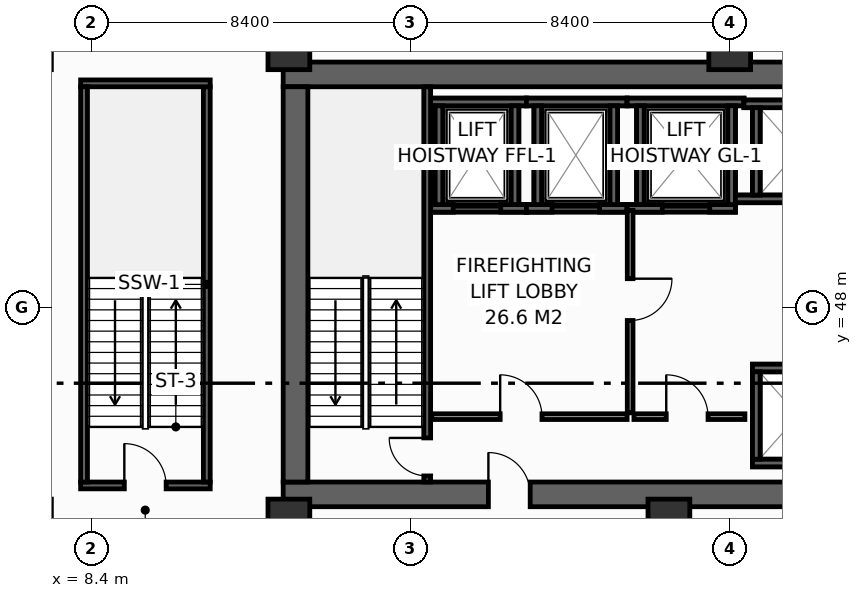
"""IFC4 building model, lengths in metres.
Left out: names, types, materials, properties, quantities, classifications, styles, units other than length and angle.
Written with IfcOpenShell. Run it as: python <this file> out.ifc"""

import sys

from ifc_helpers import new_model, si_unit, direction, frame, frame_2d, origin, origin_2d, place, context, subcontext, project, spatial, rectangle, extrude, element, fill, save


model = new_model("IFC4")
c1 = context("Model", 3, precision=1e-05, world=origin(), true_north=direction((0.0, 1.0)))
c2 = subcontext(c1, "Body", "Model", "MODEL_VIEW")
j1 = project(units=[si_unit("LENGTHUNIT", "METRE"), si_unit("PLANEANGLEUNIT", "RADIAN")], contexts=[c1])
p1 = place(None, origin())
s1 = spatial("IfcSite", under=j1, at=p1, CompositionType="ELEMENT")
p2 = place(p1, origin())
s2 = spatial("IfcBuilding", under=s1, at=p2, CompositionType="ELEMENT")
p3 = place(p2, frame((0.0, 0.0, -10.8)))
s3 = spatial("IfcBuildingStorey", under=s2, at=p3, CompositionType="ELEMENT", Elevation=-10.8)
p4 = place(p3, frame((13.45, 43.075, 0.0), z_axis=(0.0, 0.0, 1.0), x_axis=(1.0, 0.0, 0.0)))
e1 = element("IfcWall", 1, at=p4, inside=s3, PredefinedType="SHEAR", context=c2, shape_type="SweptSolid", body=[
    extrude(rectangle(XDim=33.0, YDim=0.65, at=frame_2d((16.5, 0.0))), origin(), (0.0, 0.0, 1.0), 5.05),
])
p5 = place(p4, frame((5.4, 0.0, 0.0)))
e2 = element("IfcOpeningElement", 2, at=p5, cuts=e1, PredefinedType="OPENING", context=c2, shape_type="SweptSolid", body=[
    extrude(rectangle(XDim=1.1, YDim=2.15, at=frame_2d((0.55, 1.075))), frame((0.0, 0.335, 0.0), z_axis=(0.0, -1.0, 0.0), x_axis=(1.0, 0.0, 0.0)), (0.0, 0.0, 1.0), 0.67),
])
p6 = place(p4, frame((25.6, 0.0, 0.0)))
e3 = element("IfcOpeningElement", 3, at=p6, cuts=e1, PredefinedType="OPENING", context=c2, shape_type="SweptSolid", body=[
    extrude(rectangle(XDim=1.1, YDim=2.15, at=frame_2d((0.55, 1.075))), frame((0.0, 0.335, 0.0), z_axis=(0.0, -1.0, 0.0), x_axis=(1.0, 0.0, 0.0)), (0.0, 0.0, 1.0), 0.67),
])
p7 = place(p3, frame((13.45, 54.125, 0.0), z_axis=(0.0, 0.0, 1.0), x_axis=(1.0, 0.0, 0.0)))
e4 = element("IfcWall", 4, at=p7, inside=s3, PredefinedType="SHEAR", context=c2, shape_type="SweptSolid", body=[
    extrude(rectangle(XDim=33.0, YDim=0.65, at=frame_2d((16.5, 0.0))), origin(), (0.0, 0.0, 1.0), 5.05),
])
p8 = place(p3, frame((13.775, 43.4, 0.0), z_axis=(0.0, 0.0, 1.0), x_axis=(0.0, 1.0, 0.0)))
e5 = element("IfcWall", 5, at=p8, inside=s3, PredefinedType="SHEAR", context=c2, shape_type="SweptSolid", body=[
    extrude(rectangle(XDim=10.4, YDim=0.65, at=frame_2d((5.2, 0.0))), origin(), (0.0, 0.0, 1.0), 5.05),
])
for number, where, z_axis, x_axis in (
    (6, (13.6, 54.8, 0.0), (0.0, 0.0, 1.0), (1.0, 0.0, 0.0)),
    (7, (25.2, 54.8, 0.0), (0.0, 0.0, 1.0), (1.0, 0.0, 0.0)),
    (8, (13.6, 42.4, 0.0), (0.0, 0.0, 1.0), (1.0, 0.0, 0.0)),
    (9, (23.6, 42.4, 0.0), (0.0, 0.0, 1.0), (1.0, 0.0, 0.0)),
):
    element("IfcColumn", number, at=place(p3, frame(where, z_axis=z_axis, x_axis=x_axis)), inside=s3, PredefinedType="COLUMN", context=c2, shape_type="SweptSolid", body=[
        extrude(rectangle(XDim=1.1, YDim=1.1, at=origin_2d()), origin(), (0.0, 0.0, 1.0), 5.4),
    ])
for number, where, z_axis, x_axis in (
    (10, (17.45, 50.6, -1.48), (0.0, 0.0, 1.0), (1.0, 0.0, 0.0)),
    (11, (17.45, 53.4, -1.48), (0.0, 0.0, 1.0), (1.0, 0.0, 0.0)),
):
    element("IfcWall", number, at=place(p3, frame(where, z_axis=z_axis, x_axis=x_axis)), inside=s3, PredefinedType="SHEAR", context=c2, shape_type="SweptSolid", body=[
        extrude(rectangle(XDim=2.4, YDim=0.2, at=frame_2d((1.2, 0.0))), origin(), (0.0, 0.0, 1.0), 1.48),
    ])
for number, where, z_axis, x_axis in (
    (12, (17.55, 50.7, -1.48), (0.0, 0.0, 1.0), (0.0, 1.0, 0.0)),
    (13, (19.55, 50.7, -1.48), (0.0, 0.0, 1.0), (0.0, 1.0, 0.0)),
):
    element("IfcWall", number, at=place(p3, frame(where, z_axis=z_axis, x_axis=x_axis)), inside=s3, PredefinedType="SHEAR", context=c2, shape_type="SweptSolid", body=[
        extrude(rectangle(XDim=2.6, YDim=0.2, at=frame_2d((1.3, 0.0))), origin(), (0.0, 0.0, 1.0), 1.48),
    ])
p9 = place(p3, frame((17.33, 50.6, 0.0), z_axis=(0.0, 0.0, 1.0), x_axis=(1.0, 0.0, 0.0)))
e14 = element("IfcWall", 14, at=p9, inside=s3, PredefinedType="SHEAR", context=c2, shape_type="SweptSolid", body=[
    extrude(rectangle(XDim=2.52, YDim=0.2, at=frame_2d((1.26, 0.0))), origin(), (0.0, 0.0, 1.0), 5.05),
])
p10 = place(p9, frame((0.595, 0.0, 0.0)))
e15 = element("IfcOpeningElement", 15, at=p10, cuts=e14, PredefinedType="OPENING", context=c2, shape_type="SweptSolid", body=[
    extrude(rectangle(XDim=1.25, YDim=2.3, at=frame_2d((0.625, 1.15))), frame((0.0, 0.11, 0.0), z_axis=(0.0, -1.0, 0.0), x_axis=(1.0, 0.0, 0.0)), (0.0, 0.0, 1.0), 0.22),
])
p11 = place(p3, frame((17.33, 53.4, 0.0), z_axis=(0.0, 0.0, 1.0), x_axis=(1.0, 0.0, 0.0)))
e16 = element("IfcWall", 16, at=p11, inside=s3, PredefinedType="SHEAR", context=c2, shape_type="SweptSolid", body=[
    extrude(rectangle(XDim=2.52, YDim=0.2, at=frame_2d((1.26, 0.0))), origin(), (0.0, 0.0, 1.0), 5.05),
])
for number, where, z_axis, x_axis in (
    (17, (17.55, 50.7, 0.0), (0.0, 0.0, 1.0), (0.0, 1.0, 0.0)),
    (18, (19.55, 50.7, 0.0), (0.0, 0.0, 1.0), (0.0, 1.0, 0.0)),
):
    element("IfcWall", number, at=place(p3, frame(where, z_axis=z_axis, x_axis=x_axis)), inside=s3, PredefinedType="SHEAR", context=c2, shape_type="SweptSolid", body=[
        extrude(rectangle(XDim=2.6, YDim=0.2, at=frame_2d((1.3, 0.0))), origin(), (0.0, 0.0, 1.0), 5.05),
    ])
for number, where, z_axis, x_axis in (
    (19, (19.85, 50.6, -1.48), (0.0, 0.0, 1.0), (1.0, 0.0, 0.0)),
    (20, (19.85, 53.4, -1.48), (0.0, 0.0, 1.0), (1.0, 0.0, 0.0)),
):
    element("IfcWall", number, at=place(p3, frame(where, z_axis=z_axis, x_axis=x_axis)), inside=s3, PredefinedType="SHEAR", context=c2, shape_type="SweptSolid", body=[
        extrude(rectangle(XDim=2.65, YDim=0.2, at=frame_2d((1.325, 0.0))), origin(), (0.0, 0.0, 1.0), 1.48),
    ])
for number, where, z_axis, x_axis in (
    (21, (20.15, 50.7, -1.48), (0.0, 0.0, 1.0), (0.0, 1.0, 0.0)),
    (22, (22.15, 50.7, -1.48), (0.0, 0.0, 1.0), (0.0, 1.0, 0.0)),
):
    element("IfcWall", number, at=place(p3, frame(where, z_axis=z_axis, x_axis=x_axis)), inside=s3, PredefinedType="SHEAR", context=c2, shape_type="SweptSolid", body=[
        extrude(rectangle(XDim=2.6, YDim=0.2, at=frame_2d((1.3, 0.0))), origin(), (0.0, 0.0, 1.0), 1.48),
    ])
p12 = place(p3, frame((19.85, 50.6, 0.0), z_axis=(0.0, 0.0, 1.0), x_axis=(1.0, 0.0, 0.0)))
e23 = element("IfcWall", 23, at=p12, inside=s3, PredefinedType="SHEAR", context=c2, shape_type="SweptSolid", body=[
    extrude(rectangle(XDim=2.65, YDim=0.2, at=frame_2d((1.325, 0.0))), origin(), (0.0, 0.0, 1.0), 5.05),
])
p13 = place(p12, frame((0.675, 0.0, 0.0)))
e24 = element("IfcOpeningElement", 24, at=p13, cuts=e23, PredefinedType="OPENING", context=c2, shape_type="SweptSolid", body=[
    extrude(rectangle(XDim=1.25, YDim=2.3, at=frame_2d((0.625, 1.15))), frame((0.0, 0.11, 0.0), z_axis=(0.0, -1.0, 0.0), x_axis=(1.0, 0.0, 0.0)), (0.0, 0.0, 1.0), 0.22),
])
p14 = place(p3, frame((19.85, 53.4, 0.0), z_axis=(0.0, 0.0, 1.0), x_axis=(1.0, 0.0, 0.0)))
e25 = element("IfcWall", 25, at=p14, inside=s3, PredefinedType="SHEAR", context=c2, shape_type="SweptSolid", body=[
    extrude(rectangle(XDim=2.65, YDim=0.2, at=frame_2d((1.325, 0.0))), origin(), (0.0, 0.0, 1.0), 5.05),
])
for number, where, z_axis, x_axis in (
    (26, (20.15, 50.7, 0.0), (0.0, 0.0, 1.0), (0.0, 1.0, 0.0)),
    (27, (22.15, 50.7, 0.0), (0.0, 0.0, 1.0), (0.0, 1.0, 0.0)),
):
    element("IfcWall", number, at=place(p3, frame(where, z_axis=z_axis, x_axis=x_axis)), inside=s3, PredefinedType="SHEAR", context=c2, shape_type="SweptSolid", body=[
        extrude(rectangle(XDim=2.6, YDim=0.2, at=frame_2d((1.3, 0.0))), origin(), (0.0, 0.0, 1.0), 5.05),
    ])
p15 = place(p3, frame((22.5, 50.6, -1.48), z_axis=(0.0, 0.0, 1.0), x_axis=(1.0, 0.0, 0.0)))
e28 = element("IfcWall", 28, at=p15, inside=s3, PredefinedType="SHEAR", context=c2, shape_type="SweptSolid", body=[
    extrude(rectangle(XDim=2.85, YDim=0.2, at=frame_2d((1.425, 0.0))), origin(), (0.0, 0.0, 1.0), 1.48),
])
p16 = place(p3, frame((22.5, 53.4, -1.48), z_axis=(0.0, 0.0, 1.0), x_axis=(1.0, 0.0, 0.0)))
e29 = element("IfcWall", 29, at=p16, inside=s3, PredefinedType="SHEAR", context=c2, shape_type="SweptSolid", body=[
    extrude(rectangle(XDim=3.075, YDim=0.2, at=frame_2d((1.538, 0.0))), origin(), (0.0, 0.0, 1.0), 1.48),
])
for number, where, z_axis, x_axis in (
    (30, (22.85, 50.7, -1.48), (0.0, 0.0, 1.0), (0.0, 1.0, 0.0)),
    (31, (25.25, 50.7, -1.48), (0.0, 0.0, 1.0), (0.0, 1.0, 0.0)),
):
    element("IfcWall", number, at=place(p3, frame(where, z_axis=z_axis, x_axis=x_axis)), inside=s3, PredefinedType="SHEAR", context=c2, shape_type="SweptSolid", body=[
        extrude(rectangle(XDim=2.6, YDim=0.2, at=frame_2d((1.3, 0.0))), origin(), (0.0, 0.0, 1.0), 1.48),
    ])
p17 = place(p3, frame((22.5, 50.6, 0.0), z_axis=(0.0, 0.0, 1.0), x_axis=(1.0, 0.0, 0.0)))
e32 = element("IfcWall", 32, at=p17, inside=s3, PredefinedType="SHEAR", context=c2, shape_type="SweptSolid", body=[
    extrude(rectangle(XDim=2.85, YDim=0.2, at=frame_2d((1.425, 0.0))), origin(), (0.0, 0.0, 1.0), 5.05),
])
p18 = place(p17, frame((0.925, 0.0, 0.0)))
e33 = element("IfcOpeningElement", 33, at=p18, cuts=e32, PredefinedType="OPENING", context=c2, shape_type="SweptSolid", body=[
    extrude(rectangle(XDim=1.25, YDim=2.3, at=frame_2d((0.625, 1.15))), frame((0.0, 0.11, 0.0), z_axis=(0.0, -1.0, 0.0), x_axis=(1.0, 0.0, 0.0)), (0.0, 0.0, 1.0), 0.22),
])
p19 = place(p3, frame((22.5, 53.4, 0.0), z_axis=(0.0, 0.0, 1.0), x_axis=(1.0, 0.0, 0.0)))
e34 = element("IfcWall", 34, at=p19, inside=s3, PredefinedType="SHEAR", context=c2, shape_type="SweptSolid", body=[
    extrude(rectangle(XDim=3.075, YDim=0.2, at=frame_2d((1.538, 0.0))), origin(), (0.0, 0.0, 1.0), 5.05),
])
for number, where, z_axis, x_axis in (
    (35, (22.85, 50.7, 0.0), (0.0, 0.0, 1.0), (0.0, 1.0, 0.0)),
    (36, (25.25, 50.7, 0.0), (0.0, 0.0, 1.0), (0.0, 1.0, 0.0)),
):
    element("IfcWall", number, at=place(p3, frame(where, z_axis=z_axis, x_axis=x_axis)), inside=s3, PredefinedType="SHEAR", context=c2, shape_type="SweptSolid", body=[
        extrude(rectangle(XDim=2.6, YDim=0.2, at=frame_2d((1.3, 0.0))), origin(), (0.0, 0.0, 1.0), 5.05),
    ])
p20 = place(p3, frame((25.35, 50.85, -1.48), z_axis=(0.0, 0.0, 1.0), x_axis=(1.0, 0.0, 0.0)))
e37 = element("IfcWall", 37, at=p20, inside=s3, PredefinedType="SHEAR", context=c2, shape_type="SweptSolid", body=[
    extrude(rectangle(XDim=3.025, YDim=0.2, at=frame_2d((1.512, 0.0))), origin(), (0.0, 0.0, 1.0), 1.48),
])
p21 = place(p3, frame((25.575, 53.35, -1.48), z_axis=(0.0, 0.0, 1.0), x_axis=(1.0, 0.0, 0.0)))
e38 = element("IfcWall", 38, at=p21, inside=s3, PredefinedType="SHEAR", context=c2, shape_type="SweptSolid", body=[
    extrude(rectangle(XDim=2.8, YDim=0.2, at=frame_2d((1.4, 0.0))), origin(), (0.0, 0.0, 1.0), 1.48),
])
p22 = place(p3, frame((25.9, 50.95, -1.48), z_axis=(0.0, 0.0, 1.0), x_axis=(0.0, 1.0, 0.0)))
e39 = element("IfcWall", 39, at=p22, inside=s3, PredefinedType="SHEAR", context=c2, shape_type="SweptSolid", body=[
    extrude(rectangle(XDim=2.3, YDim=0.2, at=frame_2d((1.15, 0.0))), origin(), (0.0, 0.0, 1.0), 1.48),
])
p23 = place(p3, frame((25.35, 50.85, 0.0), z_axis=(0.0, 0.0, 1.0), x_axis=(1.0, 0.0, 0.0)))
e40 = element("IfcWall", 40, at=p23, inside=s3, PredefinedType="SHEAR", context=c2, shape_type="SweptSolid", body=[
    extrude(rectangle(XDim=3.025, YDim=0.2, at=frame_2d((1.512, 0.0))), origin(), (0.0, 0.0, 1.0), 5.05),
])
p24 = place(p3, frame((25.575, 53.35, 0.0), z_axis=(0.0, 0.0, 1.0), x_axis=(1.0, 0.0, 0.0)))
e41 = element("IfcWall", 41, at=p24, inside=s3, PredefinedType="SHEAR", context=c2, shape_type="SweptSolid", body=[
    extrude(rectangle(XDim=2.8, YDim=0.2, at=frame_2d((1.4, 0.0))), origin(), (0.0, 0.0, 1.0), 5.05),
])
p25 = place(p3, frame((25.9, 50.95, 0.0), z_axis=(0.0, 0.0, 1.0), x_axis=(0.0, 1.0, 0.0)))
e42 = element("IfcWall", 42, at=p25, inside=s3, PredefinedType="SHEAR", context=c2, shape_type="SweptSolid", body=[
    extrude(rectangle(XDim=2.3, YDim=0.2, at=frame_2d((1.15, 0.0))), origin(), (0.0, 0.0, 1.0), 5.05),
])
for number, where, z_axis, x_axis in (
    (43, (25.8, 43.9, -1.48), (0.0, 0.0, 1.0), (1.0, 0.0, 0.0)),
    (44, (25.8, 46.4, -1.48), (0.0, 0.0, 1.0), (1.0, 0.0, 0.0)),
):
    element("IfcWall", number, at=place(p3, frame(where, z_axis=z_axis, x_axis=x_axis)), inside=s3, PredefinedType="SHEAR", context=c2, shape_type="SweptSolid", body=[
        extrude(rectangle(XDim=2.575, YDim=0.2, at=frame_2d((1.288, 0.0))), origin(), (0.0, 0.0, 1.0), 1.48),
    ])
p26 = place(p3, frame((25.9, 44.0, -1.48), z_axis=(0.0, 0.0, 1.0), x_axis=(0.0, 1.0, 0.0)))
e45 = element("IfcWall", 45, at=p26, inside=s3, PredefinedType="SHEAR", context=c2, shape_type="SweptSolid", body=[
    extrude(rectangle(XDim=2.3, YDim=0.2, at=frame_2d((1.15, 0.0))), origin(), (0.0, 0.0, 1.0), 1.48),
])
for number, where, z_axis, x_axis in (
    (46, (25.8, 43.9, 0.0), (0.0, 0.0, 1.0), (1.0, 0.0, 0.0)),
    (47, (25.8, 46.4, 0.0), (0.0, 0.0, 1.0), (1.0, 0.0, 0.0)),
):
    element("IfcWall", number, at=place(p3, frame(where, z_axis=z_axis, x_axis=x_axis)), inside=s3, PredefinedType="SHEAR", context=c2, shape_type="SweptSolid", body=[
        extrude(rectangle(XDim=2.575, YDim=0.2, at=frame_2d((1.288, 0.0))), origin(), (0.0, 0.0, 1.0), 5.05),
    ])
p27 = place(p3, frame((25.9, 44.0, 0.0), z_axis=(0.0, 0.0, 1.0), x_axis=(0.0, 1.0, 0.0)))
e48 = element("IfcWall", 48, at=p27, inside=s3, PredefinedType="SHEAR", context=c2, shape_type="SweptSolid", body=[
    extrude(rectangle(XDim=2.3, YDim=0.2, at=frame_2d((1.15, 0.0))), origin(), (0.0, 0.0, 1.0), 5.05),
])
p28 = place(p3, frame((17.24, 43.4, 0.0), z_axis=(0.0, 0.0, 1.0), x_axis=(0.0, 1.0, 0.0)))
e49 = element("IfcWall", 49, at=p28, inside=s3, PredefinedType="SHEAR", context=c2, shape_type="SweptSolid", body=[
    extrude(rectangle(XDim=10.4, YDim=0.18, at=frame_2d((5.2, 0.0))), origin(), (0.0, 0.0, 1.0), 5.05),
])
p29 = place(p28, frame((0.16, 0.0, 0.0)))
e50 = element("IfcOpeningElement", 50, at=p29, cuts=e49, PredefinedType="OPENING", context=c2, shape_type="SweptSolid", body=[
    extrude(rectangle(XDim=1.0, YDim=2.15, at=frame_2d((0.5, 1.075))), frame((0.0, 0.1, 0.0), z_axis=(0.0, -1.0, 0.0), x_axis=(1.0, 0.0, 0.0)), (0.0, 0.0, 1.0), 0.2),
])
p30 = place(p3, frame((8.12, 43.31, 0.0), z_axis=(0.0, 0.0, 1.0), x_axis=(1.0, 0.0, 0.0)))
e51 = element("IfcWall", 51, at=p30, inside=s3, PredefinedType="SHEAR", context=c2, shape_type="SweptSolid", body=[
    extrude(rectangle(XDim=3.41, YDim=0.18, at=frame_2d((1.705, 0.0))), origin(), (0.0, 0.0, 1.0), 5.05),
])
p31 = place(p30, frame((1.15, 0.0, 0.0)))
e52 = element("IfcOpeningElement", 52, at=p31, cuts=e51, PredefinedType="OPENING", context=c2, shape_type="SweptSolid", body=[
    extrude(rectangle(XDim=1.1, YDim=2.15, at=frame_2d((0.55, 1.075))), frame((0.0, 0.1, 0.0), z_axis=(0.0, -1.0, 0.0), x_axis=(1.0, 0.0, 0.0)), (0.0, 0.0, 1.0), 0.2),
])
p32 = place(p3, frame((11.44, 43.4, 0.0), z_axis=(0.0, 0.0, 1.0), x_axis=(0.0, 1.0, 0.0)))
e53 = element("IfcWall", 53, at=p32, inside=s3, PredefinedType="SHEAR", context=c2, shape_type="SweptSolid", body=[
    extrude(rectangle(XDim=10.4, YDim=0.18, at=frame_2d((5.2, 0.0))), origin(), (0.0, 0.0, 1.0), 5.05),
])
p33 = place(p3, frame((11.53, 53.89, 0.0), z_axis=(0.0, 0.0, 1.0), x_axis=(-1.0, 0.0, 0.0)))
e54 = element("IfcWall", 54, at=p33, inside=s3, PredefinedType="SHEAR", context=c2, shape_type="SweptSolid", body=[
    extrude(rectangle(XDim=3.41, YDim=0.18, at=frame_2d((1.705, 0.0))), origin(), (0.0, 0.0, 1.0), 5.05),
])
p34 = place(p3, frame((8.21, 53.8, 0.0), z_axis=(0.0, 0.0, 1.0), x_axis=(0.0, -1.0, 0.0)))
e55 = element("IfcWall", 55, at=p34, inside=s3, PredefinedType="SHEAR", context=c2, shape_type="SweptSolid", body=[
    extrude(rectangle(XDim=10.4, YDim=0.18, at=frame_2d((5.2, 0.0))), origin(), (0.0, 0.0, 1.0), 5.05),
])
p35 = place(p3, frame((17.36, 45.12, 0.0), z_axis=(0.0, 0.0, 1.0), x_axis=(1.0, 0.0, 0.0)))
e56 = element("IfcWall", 56, at=p35, inside=s3, PredefinedType="PARTITIONING", context=c2, shape_type="SweptSolid", body=[
    extrude(rectangle(XDim=5.14, YDim=0.15, at=frame_2d((2.57, 0.0))), origin(), (0.0, 0.0, 1.0), 5.05),
])
p36 = place(p35, frame((1.8, 0.0, 0.0)))
e57 = element("IfcOpeningElement", 57, at=p36, cuts=e56, PredefinedType="OPENING", context=c2, shape_type="SweptSolid", body=[
    extrude(rectangle(XDim=1.1, YDim=2.15, at=frame_2d((0.55, 1.075))), frame((0.0, 0.085, 0.0), z_axis=(0.0, -1.0, 0.0), x_axis=(1.0, 0.0, 0.0)), (0.0, 0.0, 1.0), 0.17),
])
p37 = place(p3, frame((22.58, 50.55, 0.0), z_axis=(0.0, 0.0, 1.0), x_axis=(0.0, -1.0, 0.0)))
e58 = element("IfcWall", 58, at=p37, inside=s3, PredefinedType="PARTITIONING", context=c2, shape_type="SweptSolid", body=[
    extrude(rectangle(XDim=5.33, YDim=0.15, at=frame_2d((2.665, 0.0))), origin(), (0.0, 0.0, 1.0), 5.05),
])
p38 = place(p37, frame((1.8, 0.0, 0.0)))
e59 = element("IfcOpeningElement", 59, at=p38, cuts=e58, PredefinedType="OPENING", context=c2, shape_type="SweptSolid", body=[
    extrude(rectangle(XDim=1.1, YDim=2.15, at=frame_2d((0.55, 1.075))), frame((0.0, 0.085, 0.0), z_axis=(0.0, -1.0, 0.0), x_axis=(1.0, 0.0, 0.0)), (0.0, 0.0, 1.0), 0.17),
])
p39 = place(p3, frame((22.68, 45.12, 0.0), z_axis=(0.0, 0.0, 1.0), x_axis=(1.0, 0.0, 0.0)))
e60 = element("IfcWall", 60, at=p39, inside=s3, PredefinedType="PARTITIONING", context=c2, shape_type="SweptSolid", body=[
    extrude(rectangle(XDim=2.92, YDim=0.15, at=frame_2d((1.46, 0.0))), origin(), (0.0, 0.0, 1.0), 5.05),
])
p40 = place(p39, frame((0.85, 0.0, 0.0)))
e61 = element("IfcOpeningElement", 61, at=p40, cuts=e60, PredefinedType="OPENING", context=c2, shape_type="SweptSolid", body=[
    extrude(rectangle(XDim=1.1, YDim=2.15, at=frame_2d((0.55, 1.075))), frame((0.0, 0.085, 0.0), z_axis=(0.0, -1.0, 0.0), x_axis=(1.0, 0.0, 0.0)), (0.0, 0.0, 1.0), 0.17),
])
p41 = place(p10, origin())
e62 = element("IfcDoor", 62, at=p41, inside=s3, OperationType="SLIDING_TO_LEFT", PredefinedType="DOOR", context=c2, shape_type="SweptSolid", body=[
    extrude(rectangle(XDim=1.25, YDim=2.3, at=frame_2d((0.625, 1.15))), frame((0.0, 0.025, 0.0), z_axis=(0.0, -1.0, 0.0), x_axis=(1.0, 0.0, 0.0)), (0.0, 0.0, 1.0), 0.05),
])
fill(e15, e62)
p42 = place(p13, origin())
e63 = element("IfcDoor", 63, at=p42, inside=s3, OperationType="SLIDING_TO_LEFT", PredefinedType="DOOR", context=c2, shape_type="SweptSolid", body=[
    extrude(rectangle(XDim=1.25, YDim=2.3, at=frame_2d((0.625, 1.15))), frame((0.0, 0.025, 0.0), z_axis=(0.0, -1.0, 0.0), x_axis=(1.0, 0.0, 0.0)), (0.0, 0.0, 1.0), 0.05),
])
fill(e24, e63)
p43 = place(p18, origin())
e64 = element("IfcDoor", 64, at=p43, inside=s3, OperationType="SLIDING_TO_LEFT", PredefinedType="DOOR", context=c2, shape_type="SweptSolid", body=[
    extrude(rectangle(XDim=1.25, YDim=2.3, at=frame_2d((0.625, 1.15))), frame((0.0, 0.025, 0.0), z_axis=(0.0, -1.0, 0.0), x_axis=(1.0, 0.0, 0.0)), (0.0, 0.0, 1.0), 0.05),
])
fill(e33, e64)
p44 = place(p29, origin())
e65 = element("IfcDoor", 65, at=p44, inside=s3, OperationType="SINGLE_SWING_RIGHT", PredefinedType="DOOR", context=c2, shape_type="SweptSolid", body=[
    extrude(rectangle(XDim=1.0, YDim=2.15, at=frame_2d((0.5, 1.075))), frame((0.0, 0.025, 0.0), z_axis=(0.0, -1.0, 0.0), x_axis=(1.0, 0.0, 0.0)), (0.0, 0.0, 1.0), 0.05),
])
fill(e50, e65)
p45 = place(p31, origin())
e66 = element("IfcDoor", 66, at=p45, inside=s3, OperationType="SINGLE_SWING_LEFT", PredefinedType="DOOR", context=c2, shape_type="SweptSolid", body=[
    extrude(rectangle(XDim=1.1, YDim=2.15, at=frame_2d((0.55, 1.075))), frame((0.0, 0.025, 0.0), z_axis=(0.0, -1.0, 0.0), x_axis=(1.0, 0.0, 0.0)), (0.0, 0.0, 1.0), 0.05),
])
fill(e52, e66)
p46 = place(p36, origin())
e67 = element("IfcDoor", 67, at=p46, inside=s3, OperationType="SINGLE_SWING_LEFT", PredefinedType="DOOR", context=c2, shape_type="SweptSolid", body=[
    extrude(rectangle(XDim=1.1, YDim=2.15, at=frame_2d((0.55, 1.075))), frame((0.0, 0.025, 0.0), z_axis=(0.0, -1.0, 0.0), x_axis=(1.0, 0.0, 0.0)), (0.0, 0.0, 1.0), 0.05),
])
fill(e57, e67)
p47 = place(p38, origin())
e68 = element("IfcDoor", 68, at=p47, inside=s3, OperationType="SINGLE_SWING_LEFT", PredefinedType="DOOR", context=c2, shape_type="SweptSolid", body=[
    extrude(rectangle(XDim=1.1, YDim=2.15, at=frame_2d((0.55, 1.075))), frame((0.0, 0.025, 0.0), z_axis=(0.0, -1.0, 0.0), x_axis=(1.0, 0.0, 0.0)), (0.0, 0.0, 1.0), 0.05),
])
fill(e59, e68)
p48 = place(p40, origin())
e69 = element("IfcDoor", 69, at=p48, inside=s3, OperationType="SINGLE_SWING_LEFT", PredefinedType="DOOR", context=c2, shape_type="SweptSolid", body=[
    extrude(rectangle(XDim=1.1, YDim=2.15, at=frame_2d((0.55, 1.075))), frame((0.0, 0.025, 0.0), z_axis=(0.0, -1.0, 0.0), x_axis=(1.0, 0.0, 0.0)), (0.0, 0.0, 1.0), 0.05),
])
fill(e61, e69)
p49 = place(p5, origin())
e70 = element("IfcDoor", 70, at=p49, inside=s3, OperationType="SINGLE_SWING_LEFT", PredefinedType="DOOR", context=c2, shape_type="SweptSolid", body=[
    extrude(rectangle(XDim=1.1, YDim=2.15, at=frame_2d((0.55, 1.075))), frame((0.0, 0.025, 0.0), z_axis=(0.0, -1.0, 0.0), x_axis=(1.0, 0.0, 0.0)), (0.0, 0.0, 1.0), 0.05),
])
fill(e2, e70)
save(model, sys.argv[1])
